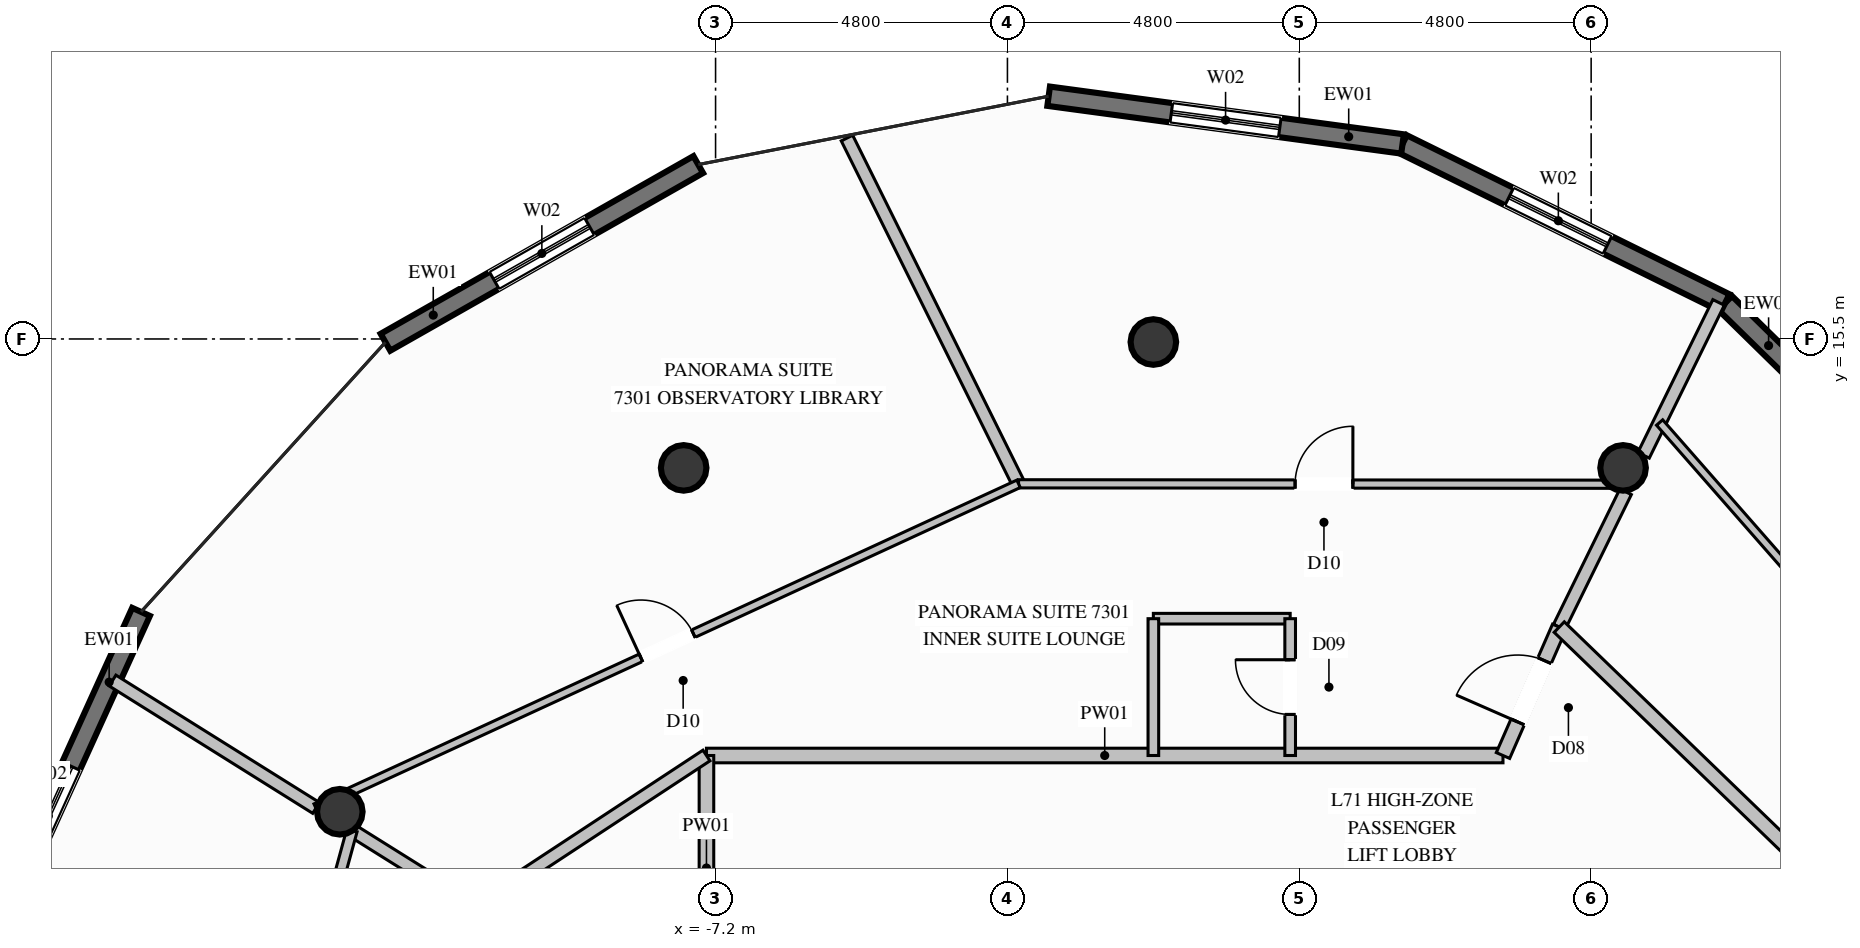
"""IFC4 building model, lengths in metres.
Left out: names, types, materials, properties, quantities, classifications, styles, units other than length and angle.
Written with IfcOpenShell. Run it as: python <this file> out.ifc"""

import sys

from ifc_helpers import new_model, si_unit, direction, frame, frame_2d, origin, origin_2d, place, context, subcontext, project, spatial, rectangle, circle, extrude, element, fill, save


model = new_model("IFC4")
c1 = context("Model", 3, precision=1e-05, world=origin(), true_north=direction((0.0, 1.0)))
c2 = subcontext(c1, "Body", "Model", "MODEL_VIEW")
j1 = project(units=[si_unit("LENGTHUNIT", "METRE"), si_unit("PLANEANGLEUNIT", "RADIAN")], contexts=[c1])
p1 = place(None, origin())
s1 = spatial("IfcSite", under=j1, at=p1, CompositionType="ELEMENT")
p2 = place(p1, origin())
s2 = spatial("IfcBuilding", under=s1, at=p2, CompositionType="ELEMENT")
p3 = place(p2, frame((0.0, 0.0, 274.4)))
s3 = spatial("IfcBuildingStorey", under=s2, at=p3, CompositionType="ELEMENT", Elevation=274.4)
for number, where, z_axis, x_axis in (
    (1, (7.725, 13.38, 0.0), (0.0, 0.0, 1.0), (1.0, 0.0, 0.0)),
    (2, (0.0, 15.45, 0.0), (0.0, 0.0, 1.0), (1.0, 0.0, 0.0)),
    (3, (-7.725, 13.38, 0.0), (0.0, 0.0, 1.0), (1.0, 0.0, 0.0)),
    (4, (-13.38, 7.725, 0.0), (0.0, 0.0, 1.0), (1.0, 0.0, 0.0)),
):
    element("IfcColumn", number, at=place(p3, frame(where, z_axis=z_axis, x_axis=x_axis)), inside=s3, PredefinedType="COLUMN", context=c2, shape_type="SweptSolid", body=[
        extrude(circle(Radius=0.375, at=origin_2d()), origin(), (0.0, 0.0, 1.0), 3.8),
    ])
p4 = place(p3, frame((9.404, 16.092, 0.0), z_axis=(0.0, 0.0, 1.0), x_axis=(0.714008055463, -0.700137484165, 0.0)))
e5 = element("IfcWall", 5, at=p4, inside=s3, PredefinedType="SOLIDWALL", context=c2, shape_type="SweptSolid", body=[
    extrude(rectangle(XDim=5.984, YDim=0.32, at=frame_2d((2.992, 0.0))), origin(), (0.0, 0.0, 1.0), 3.57),
])
p5 = place(p4, frame((2.251, 0.0, 0.85)))
e6 = element("IfcOpeningElement", 6, at=p5, cuts=e5, PredefinedType="OPENING", context=c2, shape_type="SweptSolid", body=[
    extrude(rectangle(XDim=1.5, YDim=1.2, at=frame_2d((0.75, 0.6))), frame((0.0, 0.17, 0.0), z_axis=(0.0, -1.0, 0.0), x_axis=(1.0, 0.0, 0.0)), (0.0, 0.0, 1.0), 0.34),
])
p6 = place(p3, frame((4.098, 18.707, 0.0), z_axis=(0.0, 0.0, 1.0), x_axis=(0.896987681867, -0.442055537889, 0.0)))
e7 = element("IfcWall", 7, at=p6, inside=s3, PredefinedType="SOLIDWALL", context=c2, shape_type="SweptSolid", body=[
    extrude(rectangle(XDim=5.916, YDim=0.32, at=frame_2d((2.958, 0.0))), origin(), (0.0, 0.0, 1.0), 3.57),
])
p7 = place(p6, frame((1.957, 0.0, 0.35)))
e8 = element("IfcOpeningElement", 8, at=p7, cuts=e7, PredefinedType="OPENING", context=c2, shape_type="SweptSolid", body=[
    extrude(rectangle(XDim=1.8, YDim=2.6, at=frame_2d((0.9, 1.3))), frame((0.0, 0.17, 0.0), z_axis=(0.0, -1.0, 0.0), x_axis=(1.0, 0.0, 0.0)), (0.0, 0.0, 1.0), 0.34),
])
p8 = place(p3, frame((-1.722, 19.492, 0.0), z_axis=(0.0, 0.0, 1.0), x_axis=(0.99102743865, -0.13365857938, 0.0)))
e9 = element("IfcWall", 9, at=p8, inside=s3, PredefinedType="SOLIDWALL", context=c2, shape_type="SweptSolid", body=[
    extrude(rectangle(XDim=5.873, YDim=0.32, at=frame_2d((2.936, 0.0))), origin(), (0.0, 0.0, 1.0), 3.57),
])
p9 = place(p8, frame((2.036, 0.0, 0.35)))
e10 = element("IfcOpeningElement", 10, at=p9, cuts=e9, PredefinedType="OPENING", context=c2, shape_type="SweptSolid", body=[
    extrude(rectangle(XDim=1.8, YDim=2.6, at=frame_2d((0.9, 1.3))), frame((0.0, 0.17, 0.0), z_axis=(0.0, -1.0, 0.0), x_axis=(1.0, 0.0, 0.0)), (0.0, 0.0, 1.0), 0.34),
])
p10 = place(p3, frame((-12.629, 15.446, 0.0), z_axis=(0.0, 0.0, 1.0), x_axis=(0.869510133523, 0.493915101714, 0.0)))
e11 = element("IfcWall", 11, at=p10, inside=s3, PredefinedType="SOLIDWALL", context=c2, shape_type="SweptSolid", body=[
    extrude(rectangle(XDim=5.916, YDim=0.32, at=frame_2d((2.958, 0.0))), origin(), (0.0, 0.0, 1.0), 3.57),
])
p11 = place(p10, frame((2.058, 0.0, 0.35)))
e12 = element("IfcOpeningElement", 12, at=p11, cuts=e11, PredefinedType="OPENING", context=c2, shape_type="SweptSolid", body=[
    extrude(rectangle(XDim=1.8, YDim=2.6, at=frame_2d((0.9, 1.3))), frame((0.0, 0.17, 0.0), z_axis=(0.0, -1.0, 0.0), x_axis=(1.0, 0.0, 0.0)), (0.0, 0.0, 1.0), 0.34),
])
p12 = place(p3, frame((-19.151, 5.5, 0.0), z_axis=(0.0, 0.0, 1.0), x_axis=(0.413325805639, 0.910583207836, 0.0)))
e13 = element("IfcWall", 13, at=p12, inside=s3, PredefinedType="SOLIDWALL", context=c2, shape_type="SweptSolid", body=[
    extrude(rectangle(XDim=6.053, YDim=0.32, at=frame_2d((3.027, 0.0))), origin(), (0.0, 0.0, 1.0), 3.57),
])
p13 = place(p12, frame((1.466, 0.0, 0.35)))
e14 = element("IfcOpeningElement", 14, at=p13, cuts=e13, PredefinedType="OPENING", context=c2, shape_type="SweptSolid", body=[
    extrude(rectangle(XDim=1.8, YDim=2.6, at=frame_2d((0.9, 1.3))), frame((0.0, 0.17, 0.0), z_axis=(0.0, -1.0, 0.0), x_axis=(1.0, 0.0, 0.0)), (0.0, 0.0, 1.0), 0.34),
])
p14 = place(p3, frame((-7.35, 8.65, 0.0), z_axis=(0.0, 0.0, 1.0), x_axis=(1.0, 0.0, 0.0)))
e15 = element("IfcWall", 15, at=p14, inside=s3, PredefinedType="PARTITIONING", context=c2, shape_type="SweptSolid", body=[
    extrude(rectangle(XDim=13.1, YDim=0.24, at=frame_2d((6.55, 0.0))), origin(), (0.0, 0.0, 1.0), 3.57),
])
p15 = place(p3, frame((-7.35, 4.95, 0.0), z_axis=(0.0, 0.0, 1.0), x_axis=(0.0, 1.0, 0.0)))
e16 = element("IfcWall", 16, at=p15, inside=s3, PredefinedType="PARTITIONING", context=c2, shape_type="SweptSolid", body=[
    extrude(rectangle(XDim=3.7, YDim=0.24, at=frame_2d((1.85, 0.0))), origin(), (0.0, 0.0, 1.0), 2.655),
])
p16 = place(p3, frame((6.675, 10.762, 0.0), z_axis=(0.0, 0.0, 1.0), x_axis=(0.440582273055, 0.897712237117, 0.0)))
e17 = element("IfcWall", 17, at=p16, inside=s3, PredefinedType="PARTITIONING", context=c2, shape_type="SweptSolid", body=[
    extrude(rectangle(XDim=2.479, YDim=0.21, at=frame_2d((1.239, 0.0))), origin(), (0.0, 0.0, 1.0), 3.086),
])
p17 = place(p3, frame((8.062, 13.587, 0.0), z_axis=(0.0, 0.0, 1.0), x_axis=(0.440576121929, 0.897715255961, 0.0)))
e18 = element("IfcWall", 18, at=p17, inside=s3, PredefinedType="PARTITIONING", context=c2, shape_type="SweptSolid", body=[
    extrude(rectangle(XDim=2.801, YDim=0.21, at=frame_2d((1.4, 0.0))), origin(), (0.0, 0.0, 1.0), 3.57),
])
p18 = place(p3, frame((-11.152, 6.15, 0.0), z_axis=(0.0, 0.0, 1.0), x_axis=(-0.847696016943, 0.530482292692, 0.0)))
e19 = element("IfcWall", 19, at=p18, inside=s3, PredefinedType="PARTITIONING", context=c2, shape_type="SweptSolid", body=[
    extrude(rectangle(XDim=2.361, YDim=0.21, at=frame_2d((1.18, 0.0))), origin(), (0.0, 0.0, 1.0), 3.086),
])
p19 = place(p3, frame((-13.77, 7.788, 0.0), z_axis=(0.0, 0.0, 1.0), x_axis=(-0.84770992622, 0.530460065404, 0.0)))
e20 = element("IfcWall", 20, at=p19, inside=s3, PredefinedType="PARTITIONING", context=c2, shape_type="SweptSolid", body=[
    extrude(rectangle(XDim=3.949, YDim=0.21, at=frame_2d((1.975, 0.0))), origin(), (0.0, 0.0, 1.0), 3.57),
])
p20 = place(p3, frame((0.0, 10.9, 0.0), z_axis=(0.0, 0.0, 1.0), x_axis=(1.0, 0.0, 0.0)))
e21 = element("IfcWall", 21, at=p20, inside=s3, PredefinedType="PLUMBINGWALL", context=c2, shape_type="SweptSolid", body=[
    extrude(rectangle(XDim=2.25, YDim=0.175, at=frame_2d((1.125, 0.0))), origin(), (0.0, 0.0, 1.0), 3.253),
])
p21 = place(p3, frame((0.0, 10.9, 0.0), z_axis=(0.0, 0.0, 1.0), x_axis=(0.0, -1.0, 0.0)))
e22 = element("IfcWall", 22, at=p21, inside=s3, PredefinedType="PLUMBINGWALL", context=c2, shape_type="SweptSolid", body=[
    extrude(rectangle(XDim=2.25, YDim=0.175, at=frame_2d((1.125, 0.0))), origin(), (0.0, 0.0, 1.0), 3.57),
])
p22 = place(p3, frame((2.25, 8.65, 0.0), z_axis=(0.0, 0.0, 1.0), x_axis=(0.0, 1.0, 0.0)))
e23 = element("IfcWall", 23, at=p22, inside=s3, PredefinedType="PLUMBINGWALL", context=c2, shape_type="SweptSolid", body=[
    extrude(rectangle(XDim=2.25, YDim=0.175, at=frame_2d((1.125, 0.0))), origin(), (0.0, 0.0, 1.0), 3.57),
])
p23 = place(p22, frame((0.675, 0.0, 0.0)))
e24 = element("IfcOpeningElement", 24, at=p23, cuts=e23, PredefinedType="OPENING", context=c2, shape_type="SweptSolid", body=[
    extrude(rectangle(XDim=0.9, YDim=2.1, at=frame_2d((0.45, 1.05))), frame((0.0, 0.098, 0.0), z_axis=(0.0, -1.0, 0.0), x_axis=(1.0, 0.0, 0.0)), (0.0, 0.0, 1.0), 0.195),
])
p24 = place(p3, frame((-11.152, 6.15, 0.0), z_axis=(0.0, 0.0, 1.0), x_axis=(0.835549960432, 0.549414473437, 0.0)))
e25 = element("IfcWall", 25, at=p24, inside=s3, PredefinedType="PARTITIONING", context=c2, shape_type="SweptSolid", body=[
    extrude(rectangle(XDim=4.55, YDim=0.21, at=frame_2d((2.275, 0.0))), origin(), (0.0, 0.0, 1.0), 3.57),
])
p25 = place(p3, frame((5.75, 8.65, 0.0), z_axis=(0.0, 0.0, 1.0), x_axis=(0.401190953907, 0.915994442398, 0.0)))
e26 = element("IfcWall", 26, at=p25, inside=s3, PredefinedType="PARTITIONING", context=c2, shape_type="SweptSolid", body=[
    extrude(rectangle(XDim=2.306, YDim=0.24, at=frame_2d((1.153, 0.0))), origin(), (0.0, 0.0, 1.0), 3.086),
])
p26 = place(p25, frame((0.603, 0.0, 0.0)))
e27 = element("IfcOpeningElement", 27, at=p26, cuts=e26, PredefinedType="OPENING", context=c2, shape_type="SweptSolid", body=[
    extrude(rectangle(XDim=1.1, YDim=2.3, at=frame_2d((0.55, 1.15))), frame((0.0, 0.13, 0.0), z_axis=(0.0, -1.0, 0.0), x_axis=(1.0, 0.0, 0.0)), (0.0, 0.0, 1.0), 0.26),
])
p27 = place(p3, frame((-2.217, 13.118, 0.0), z_axis=(0.0, 0.0, 1.0), x_axis=(-0.444565552275, 0.895746319965, 0.0)))
e28 = element("IfcWall", 28, at=p27, inside=s3, PredefinedType="PARTITIONING", context=c2, shape_type="SweptSolid", body=[
    extrude(rectangle(XDim=6.348, YDim=0.21, at=frame_2d((3.174, 0.0))), origin(), (0.0, 0.0, 1.0), 3.57),
])
p28 = place(p3, frame((-2.217, 13.118, 0.0), z_axis=(0.0, 0.0, 1.0), x_axis=(0.999999768435, -0.000680536494, 0.0)))
e29 = element("IfcWall", 29, at=p28, inside=s3, PredefinedType="PARTITIONING", context=c2, shape_type="SweptSolid", body=[
    extrude(rectangle(XDim=10.045, YDim=0.135, at=frame_2d((5.022, 0.0))), origin(), (0.0, 0.0, 1.0), 3.138),
])
p29 = place(p28, frame((4.548, 0.0, 0.0)))
e30 = element("IfcOpeningElement", 30, at=p29, cuts=e29, PredefinedType="OPENING", context=c2, shape_type="SweptSolid", body=[
    extrude(rectangle(XDim=0.95, YDim=2.1, at=frame_2d((0.475, 1.05))), frame((0.0, 0.078, 0.0), z_axis=(0.0, -1.0, 0.0), x_axis=(1.0, 0.0, 0.0)), (0.0, 0.0, 1.0), 0.155),
])
p30 = place(p3, frame((-13.777, 7.793, 0.0), z_axis=(0.0, 0.0, 1.0), x_axis=(0.908271846509, 0.418380512021, 0.0)))
e31 = element("IfcWall", 31, at=p30, inside=s3, PredefinedType="PARTITIONING", context=c2, shape_type="SweptSolid", body=[
    extrude(rectangle(XDim=12.728, YDim=0.135, at=frame_2d((6.364, 0.0))), origin(), (0.0, 0.0, 1.0), 3.138),
])
p31 = place(p30, frame((5.889, 0.0, 0.0)))
e32 = element("IfcOpeningElement", 32, at=p31, cuts=e31, PredefinedType="OPENING", context=c2, shape_type="SweptSolid", body=[
    extrude(rectangle(XDim=0.95, YDim=2.1, at=frame_2d((0.475, 1.05))), frame((0.0, 0.078, 0.0), z_axis=(0.0, -1.0, 0.0), x_axis=(1.0, 0.0, 0.0)), (0.0, 0.0, 1.0), 0.155),
])
p32 = place(p3, frame((-13.18, 7.419, 0.0), z_axis=(0.0, 0.0, 1.0), x_axis=(-0.264530676723, -0.96437727113, 0.0)))
e33 = element("IfcWall", 33, at=p32, inside=s3, PredefinedType="PLUMBINGWALL", context=c2, shape_type="SweptSolid", body=[
    extrude(rectangle(XDim=3.274, YDim=0.175, at=frame_2d((1.637, 0.0))), origin(), (0.0, 0.0, 1.0), 3.138),
])
p33 = place(p3, frame((11.452, 6.15, 0.0), z_axis=(0.0, 0.0, 1.0), x_axis=(-0.719407162497, 0.694588608133, 0.0)))
e34 = element("IfcWall", 34, at=p33, inside=s3, PredefinedType="PARTITIONING", context=c2, shape_type="SweptSolid", body=[
    extrude(rectangle(XDim=6.64, YDim=0.24, at=frame_2d((3.32, 0.0))), origin(), (0.0, 0.0, 1.0), 3.57),
])
p34 = place(p3, frame((13.851, 7.826, 0.0), z_axis=(0.0, 0.0, 1.0), x_axis=(-0.659356064883, 0.751830818537, 0.0)))
e35 = element("IfcWall", 35, at=p34, inside=s3, PredefinedType="PARTITIONING", context=c2, shape_type="SweptSolid", body=[
    extrude(rectangle(XDim=8.38, YDim=0.135, at=frame_2d((4.19, 0.0))), origin(), (0.0, 0.0, 1.0), 3.005),
])
p35 = place(p34, frame((3.715, 0.0, 0.0)))
e36 = element("IfcOpeningElement", 36, at=p35, cuts=e35, PredefinedType="OPENING", context=c2, shape_type="SweptSolid", body=[
    extrude(rectangle(XDim=0.95, YDim=2.1, at=frame_2d((0.475, 1.05))), frame((0.0, 0.078, 0.0), z_axis=(0.0, -1.0, 0.0), x_axis=(1.0, 0.0, 0.0)), (0.0, 0.0, 1.0), 0.155),
])
p36 = place(p7, origin())
e37 = element("IfcWindow", 37, at=p36, inside=s3, PartitioningType="SINGLE_PANEL", PredefinedType="WINDOW", context=c2, shape_type="SweptSolid", body=[
    extrude(rectangle(XDim=1.8, YDim=2.6, at=frame_2d((0.9, 1.3))), frame((0.0, 0.03, 0.0), z_axis=(0.0, -1.0, 0.0), x_axis=(1.0, 0.0, 0.0)), (0.0, 0.0, 1.0), 0.06),
])
fill(e8, e37)
p37 = place(p9, origin())
e38 = element("IfcWindow", 38, at=p37, inside=s3, PartitioningType="SINGLE_PANEL", PredefinedType="WINDOW", context=c2, shape_type="SweptSolid", body=[
    extrude(rectangle(XDim=1.8, YDim=2.6, at=frame_2d((0.9, 1.3))), frame((0.0, 0.03, 0.0), z_axis=(0.0, -1.0, 0.0), x_axis=(1.0, 0.0, 0.0)), (0.0, 0.0, 1.0), 0.06),
])
fill(e10, e38)
p38 = place(p11, origin())
e39 = element("IfcWindow", 39, at=p38, inside=s3, PartitioningType="SINGLE_PANEL", PredefinedType="WINDOW", context=c2, shape_type="SweptSolid", body=[
    extrude(rectangle(XDim=1.8, YDim=2.6, at=frame_2d((0.9, 1.3))), frame((0.0, 0.03, 0.0), z_axis=(0.0, -1.0, 0.0), x_axis=(1.0, 0.0, 0.0)), (0.0, 0.0, 1.0), 0.06),
])
fill(e12, e39)
p39 = place(p13, origin())
e40 = element("IfcWindow", 40, at=p39, inside=s3, PartitioningType="SINGLE_PANEL", PredefinedType="WINDOW", context=c2, shape_type="SweptSolid", body=[
    extrude(rectangle(XDim=1.8, YDim=2.6, at=frame_2d((0.9, 1.3))), frame((0.0, 0.03, 0.0), z_axis=(0.0, -1.0, 0.0), x_axis=(1.0, 0.0, 0.0)), (0.0, 0.0, 1.0), 0.06),
])
fill(e14, e40)
p40 = place(p23, origin())
e41 = element("IfcDoor", 41, at=p40, inside=s3, OperationType="SINGLE_SWING_RIGHT", PredefinedType="DOOR", context=c2, shape_type="SweptSolid", body=[
    extrude(rectangle(XDim=0.9, YDim=2.1, at=frame_2d((0.45, 1.05))), frame((0.0, 0.025, 0.0), z_axis=(0.0, -1.0, 0.0), x_axis=(1.0, 0.0, 0.0)), (0.0, 0.0, 1.0), 0.05),
])
fill(e24, e41)
p41 = place(p26, origin())
e42 = element("IfcDoor", 42, at=p41, inside=s3, OperationType="SINGLE_SWING_LEFT", PredefinedType="DOOR", context=c2, shape_type="SweptSolid", body=[
    extrude(rectangle(XDim=1.1, YDim=2.3, at=frame_2d((0.55, 1.15))), frame((0.0, 0.025, 0.0), z_axis=(0.0, -1.0, 0.0), x_axis=(1.0, 0.0, 0.0)), (0.0, 0.0, 1.0), 0.05),
])
fill(e27, e42)
p42 = place(p29, origin())
e43 = element("IfcDoor", 43, at=p42, inside=s3, OperationType="SINGLE_SWING_RIGHT", PredefinedType="DOOR", context=c2, shape_type="SweptSolid", body=[
    extrude(rectangle(XDim=0.95, YDim=2.1, at=frame_2d((0.475, 1.05))), frame((0.0, 0.025, 0.0), z_axis=(0.0, -1.0, 0.0), x_axis=(1.0, 0.0, 0.0)), (0.0, 0.0, 1.0), 0.05),
])
fill(e30, e43)
p43 = place(p31, origin())
e44 = element("IfcDoor", 44, at=p43, inside=s3, OperationType="SINGLE_SWING_LEFT", PredefinedType="DOOR", context=c2, shape_type="SweptSolid", body=[
    extrude(rectangle(XDim=0.95, YDim=2.1, at=frame_2d((0.475, 1.05))), frame((0.0, 0.025, 0.0), z_axis=(0.0, -1.0, 0.0), x_axis=(1.0, 0.0, 0.0)), (0.0, 0.0, 1.0), 0.05),
])
fill(e32, e44)
save(model, sys.argv[1])
